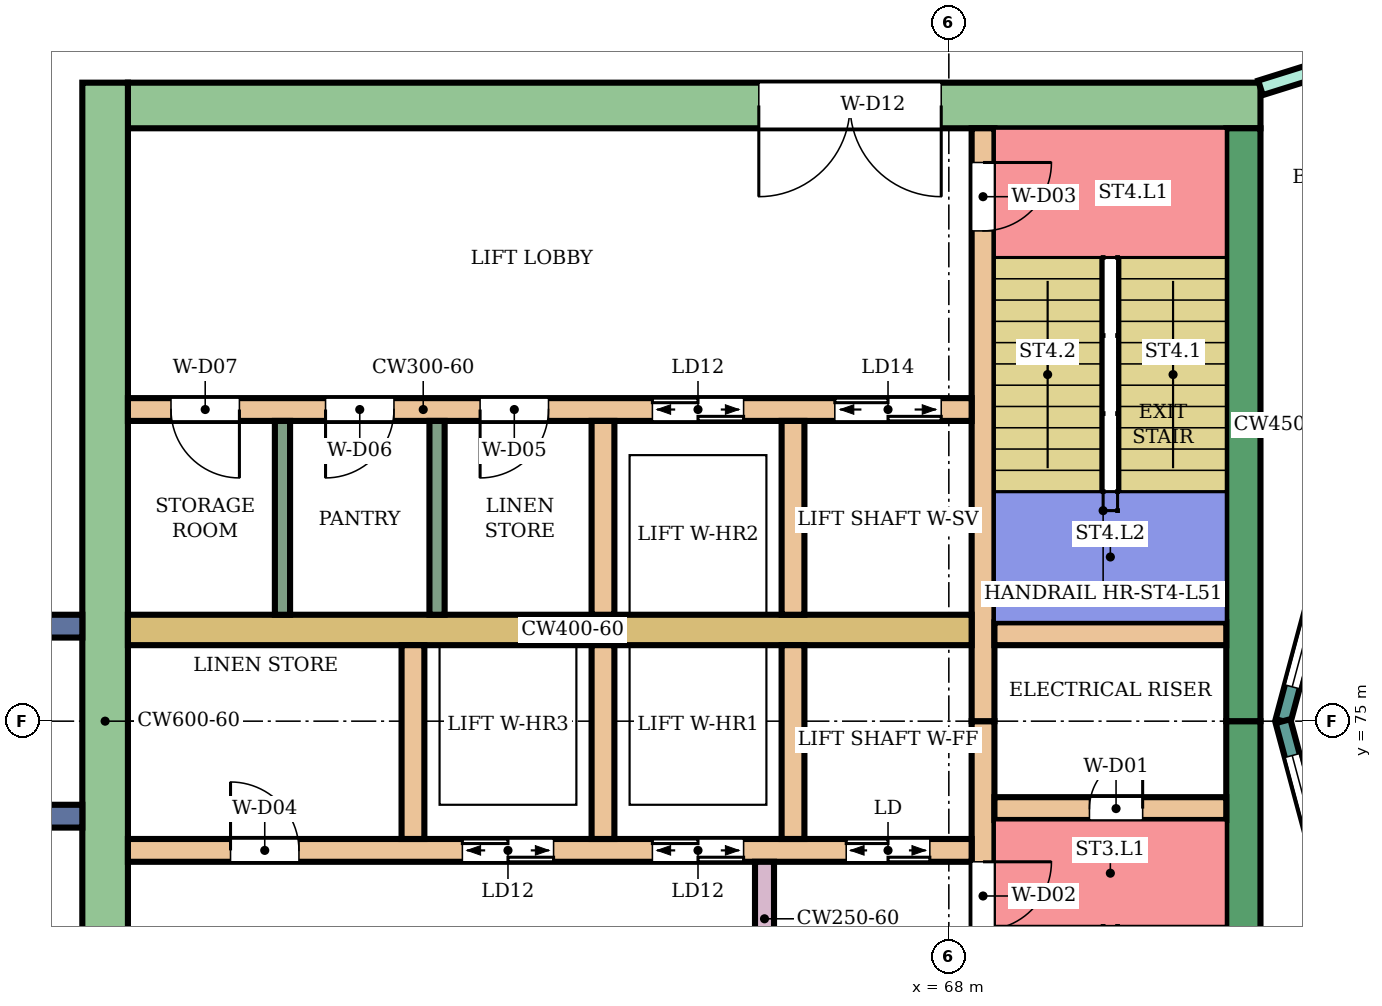
"""IFC4 building model, lengths in metres.
Left out: names, types, materials, properties, quantities, classifications, styles, units other than length and angle.
Written with IfcOpenShell. Run it as: python <this file> out.ifc"""

import sys

from ifc_helpers import new_model, si_unit, direction, frame, frame_2d, origin, place, context, subcontext, project, spatial, rectangle, extrude, element, fill, save


model = new_model("IFC4")
c1 = context("Model", 3, precision=1e-05, world=origin(), true_north=direction((0.0, 1.0)))
c2 = subcontext(c1, "Body", "Model", "MODEL_VIEW")
j1 = project(units=[si_unit("LENGTHUNIT", "METRE"), si_unit("PLANEANGLEUNIT", "RADIAN")], contexts=[c1])
p1 = place(None, origin())
s1 = spatial("IfcSite", under=j1, at=p1, CompositionType="ELEMENT")
p2 = place(p1, origin())
s2 = spatial("IfcBuilding", under=s1, at=p2, CompositionType="ELEMENT")
p3 = place(p2, frame((0.0, 0.0, 220.9)))
s3 = spatial("IfcBuildingStorey", under=s2, at=p3, CompositionType="ELEMENT", Elevation=220.9)
p4 = place(p3, frame((72.1, 83.1, 0.0), z_axis=(0.0, 0.0, 1.0), x_axis=(-1.0, 0.0, 0.0)))
e1 = element("IfcWall", 1, at=p4, inside=s3, PredefinedType="SHEAR", context=c2, shape_type="SweptSolid", body=[
    extrude(rectangle(XDim=14.9, YDim=0.6, at=frame_2d((7.45, 0.0))), origin(), (0.0, 0.0, 1.0), 3.88),
])
p5 = place(p4, frame((4.2, 0.0, 0.0)))
e2 = element("IfcOpeningElement", 2, at=p5, cuts=e1, PredefinedType="OPENING", context=c2, shape_type="SweptSolid", body=[
    extrude(rectangle(XDim=2.4, YDim=2.4, at=frame_2d((1.2, 1.2))), frame((0.0, 0.31, 0.0), z_axis=(0.0, -1.0, 0.0), x_axis=(1.0, 0.0, 0.0)), (0.0, 0.0, 1.0), 0.62),
])
for number, where, z_axis, x_axis in (
    (3, (71.875, 75.0, 0.0), (0.0, 0.0, 1.0), (0.0, -1.0, 0.0)),
    (4, (71.875, 82.8, 0.0), (0.0, 0.0, 1.0), (0.0, -1.0, 0.0)),
):
    element("IfcWall", number, at=place(p3, frame(where, z_axis=z_axis, x_axis=x_axis)), inside=s3, PredefinedType="SHEAR", context=c2, shape_type="SweptSolid", body=[
        extrude(rectangle(XDim=7.8, YDim=0.45, at=frame_2d((3.9, 0.0))), origin(), (0.0, 0.0, 1.0), 3.88),
    ])
p6 = place(p3, frame((56.9, 83.4, 0.0), z_axis=(0.0, 0.0, 1.0), x_axis=(0.0, -1.0, 0.0)))
e5 = element("IfcWall", 5, at=p6, inside=s3, PredefinedType="SHEAR", context=c2, shape_type="SweptSolid", body=[
    extrude(rectangle(XDim=16.8, YDim=0.6, at=frame_2d((8.4, 0.0))), origin(), (0.0, 0.0, 1.0), 3.88),
])
p7 = place(p3, frame((68.45, 75.0, 0.0), z_axis=(0.0, 0.0, 1.0), x_axis=(0.0, -1.0, 0.0)))
e6 = element("IfcWall", 6, at=p7, inside=s3, PredefinedType="SHEAR", context=c2, shape_type="SweptSolid", body=[
    extrude(rectangle(XDim=7.8, YDim=0.3, at=frame_2d((3.9, 0.0))), origin(), (0.0, 0.0, 1.0), 3.88),
])
p8 = place(p7, frame((1.85, 0.0, 0.0)))
e7 = element("IfcOpeningElement", 7, at=p8, cuts=e6, PredefinedType="OPENING", context=c2, shape_type="SweptSolid", body=[
    extrude(rectangle(XDim=0.9, YDim=2.1, at=frame_2d((0.45, 1.05))), frame((0.0, 0.16, 0.0), z_axis=(0.0, -1.0, 0.0), x_axis=(1.0, 0.0, 0.0)), (0.0, 0.0, 1.0), 0.32),
])
p9 = place(p3, frame((68.45, 82.8, 0.0), z_axis=(0.0, 0.0, 1.0), x_axis=(0.0, -1.0, 0.0)))
e8 = element("IfcWall", 8, at=p9, inside=s3, PredefinedType="SHEAR", context=c2, shape_type="SweptSolid", body=[
    extrude(rectangle(XDim=7.8, YDim=0.3, at=frame_2d((3.9, 0.0))), origin(), (0.0, 0.0, 1.0), 3.88),
])
p10 = place(p9, frame((0.45, 0.0, 0.0)))
e9 = element("IfcOpeningElement", 9, at=p10, cuts=e8, PredefinedType="OPENING", context=c2, shape_type="SweptSolid", body=[
    extrude(rectangle(XDim=0.9, YDim=2.1, at=frame_2d((0.45, 1.05))), frame((0.0, 0.16, 0.0), z_axis=(0.0, -1.0, 0.0), x_axis=(1.0, 0.0, 0.0)), (0.0, 0.0, 1.0), 0.32),
])
p11 = place(p3, frame((71.65, 73.85, 0.0), z_axis=(0.0, 0.0, 1.0), x_axis=(-1.0, 0.0, 0.0)))
e10 = element("IfcWall", 10, at=p11, inside=s3, PredefinedType="SHEAR", context=c2, shape_type="SweptSolid", body=[
    extrude(rectangle(XDim=3.05, YDim=0.3, at=frame_2d((1.525, 0.0))), origin(), (0.0, 0.0, 1.0), 3.88),
])
p12 = place(p11, frame((1.1, 0.0, 0.0)))
e11 = element("IfcOpeningElement", 11, at=p12, cuts=e10, PredefinedType="OPENING", context=c2, shape_type="SweptSolid", body=[
    extrude(rectangle(XDim=0.7, YDim=2.0, at=frame_2d((0.35, 1.0))), frame((0.0, 0.16, 0.0), z_axis=(0.0, -1.0, 0.0), x_axis=(1.0, 0.0, 0.0)), (0.0, 0.0, 1.0), 0.32),
])
p13 = place(p3, frame((71.65, 76.15, 0.0), z_axis=(0.0, 0.0, 1.0), x_axis=(-1.0, 0.0, 0.0)))
e12 = element("IfcWall", 12, at=p13, inside=s3, PredefinedType="SHEAR", context=c2, shape_type="SweptSolid", body=[
    extrude(rectangle(XDim=3.05, YDim=0.3, at=frame_2d((1.525, 0.0))), origin(), (0.0, 0.0, 1.0), 3.88),
])
p14 = place(p3, frame((68.3, 73.3, 0.0), z_axis=(0.0, 0.0, 1.0), x_axis=(-1.0, 0.0, 0.0)))
e13 = element("IfcWall", 13, at=p14, inside=s3, PredefinedType="SHEAR", context=c2, shape_type="SweptSolid", body=[
    extrude(rectangle(XDim=11.1, YDim=0.3, at=frame_2d((5.55, 0.0))), origin(), (0.0, 0.0, 1.0), 3.88),
])
p15 = place(p14, frame((0.55, 0.0, 0.0)))
e14 = element("IfcOpeningElement", 14, at=p15, cuts=e13, PredefinedType="OPENING", context=c2, shape_type="SweptSolid", body=[
    extrude(rectangle(XDim=1.1, YDim=2.1, at=frame_2d((0.55, 1.05))), frame((0.0, 0.16, 0.0), z_axis=(0.0, -1.0, 0.0), x_axis=(1.0, 0.0, 0.0)), (0.0, 0.0, 1.0), 0.32),
])
p16 = place(p14, frame((3.0, 0.0, 0.0)))
e15 = element("IfcOpeningElement", 15, at=p16, cuts=e13, PredefinedType="OPENING", context=c2, shape_type="SweptSolid", body=[
    extrude(rectangle(XDim=1.2, YDim=2.1, at=frame_2d((0.6, 1.05))), frame((0.0, 0.16, 0.0), z_axis=(0.0, -1.0, 0.0), x_axis=(1.0, 0.0, 0.0)), (0.0, 0.0, 1.0), 0.32),
])
p17 = place(p14, frame((5.5, 0.0, 0.0)))
e16 = element("IfcOpeningElement", 16, at=p17, cuts=e13, PredefinedType="OPENING", context=c2, shape_type="SweptSolid", body=[
    extrude(rectangle(XDim=1.2, YDim=2.1, at=frame_2d((0.6, 1.05))), frame((0.0, 0.16, 0.0), z_axis=(0.0, -1.0, 0.0), x_axis=(1.0, 0.0, 0.0)), (0.0, 0.0, 1.0), 0.32),
])
p18 = place(p14, frame((8.85, 0.0, 0.0)))
e17 = element("IfcOpeningElement", 17, at=p18, cuts=e13, PredefinedType="OPENING", context=c2, shape_type="SweptSolid", body=[
    extrude(rectangle(XDim=0.9, YDim=2.1, at=frame_2d((0.45, 1.05))), frame((0.0, 0.16, 0.0), z_axis=(0.0, -1.0, 0.0), x_axis=(1.0, 0.0, 0.0)), (0.0, 0.0, 1.0), 0.32),
])
p19 = place(p3, frame((68.3, 76.2, 0.0), z_axis=(0.0, 0.0, 1.0), x_axis=(-1.0, 0.0, 0.0)))
e18 = element("IfcWall", 18, at=p19, inside=s3, PredefinedType="SHEAR", context=c2, shape_type="SweptSolid", body=[
    extrude(rectangle(XDim=11.1, YDim=0.4, at=frame_2d((5.55, 0.0))), origin(), (0.0, 0.0, 1.0), 3.88),
])
p20 = place(p3, frame((68.3, 79.1, 0.0), z_axis=(0.0, 0.0, 1.0), x_axis=(-1.0, 0.0, 0.0)))
e19 = element("IfcWall", 19, at=p20, inside=s3, PredefinedType="SHEAR", context=c2, shape_type="SweptSolid", body=[
    extrude(rectangle(XDim=11.1, YDim=0.3, at=frame_2d((5.55, 0.0))), origin(), (0.0, 0.0, 1.0), 3.88),
])
p21 = place(p20, frame((0.4, 0.0, 0.0)))
e20 = element("IfcOpeningElement", 20, at=p21, cuts=e19, PredefinedType="OPENING", context=c2, shape_type="SweptSolid", body=[
    extrude(rectangle(XDim=1.4, YDim=2.1, at=frame_2d((0.7, 1.05))), frame((0.0, 0.16, 0.0), z_axis=(0.0, -1.0, 0.0), x_axis=(1.0, 0.0, 0.0)), (0.0, 0.0, 1.0), 0.32),
])
p22 = place(p20, frame((3.0, 0.0, 0.0)))
e21 = element("IfcOpeningElement", 21, at=p22, cuts=e19, PredefinedType="OPENING", context=c2, shape_type="SweptSolid", body=[
    extrude(rectangle(XDim=1.2, YDim=2.1, at=frame_2d((0.6, 1.05))), frame((0.0, 0.16, 0.0), z_axis=(0.0, -1.0, 0.0), x_axis=(1.0, 0.0, 0.0)), (0.0, 0.0, 1.0), 0.32),
])
p23 = place(p20, frame((5.567, 0.0, 0.0)))
e22 = element("IfcOpeningElement", 22, at=p23, cuts=e19, PredefinedType="OPENING", context=c2, shape_type="SweptSolid", body=[
    extrude(rectangle(XDim=0.9, YDim=2.1, at=frame_2d((0.45, 1.05))), frame((0.0, 0.16, 0.0), z_axis=(0.0, -1.0, 0.0), x_axis=(1.0, 0.0, 0.0)), (0.0, 0.0, 1.0), 0.32),
])
p24 = place(p20, frame((7.6, 0.0, 0.0)))
e23 = element("IfcOpeningElement", 23, at=p24, cuts=e19, PredefinedType="OPENING", context=c2, shape_type="SweptSolid", body=[
    extrude(rectangle(XDim=0.9, YDim=2.1, at=frame_2d((0.45, 1.05))), frame((0.0, 0.16, 0.0), z_axis=(0.0, -1.0, 0.0), x_axis=(1.0, 0.0, 0.0)), (0.0, 0.0, 1.0), 0.32),
])
p25 = place(p20, frame((9.633, 0.0, 0.0)))
e24 = element("IfcOpeningElement", 24, at=p25, cuts=e19, PredefinedType="OPENING", context=c2, shape_type="SweptSolid", body=[
    extrude(rectangle(XDim=0.9, YDim=2.1, at=frame_2d((0.45, 1.05))), frame((0.0, 0.16, 0.0), z_axis=(0.0, -1.0, 0.0), x_axis=(1.0, 0.0, 0.0)), (0.0, 0.0, 1.0), 0.32),
])
for number, where, z_axis, x_axis in (
    (25, (65.95, 76.0, 0.0), (0.0, 0.0, 1.0), (0.0, -1.0, 0.0)),
    (26, (63.45, 76.0, 0.0), (0.0, 0.0, 1.0), (0.0, -1.0, 0.0)),
    (27, (60.95, 76.0, 0.0), (0.0, 0.0, 1.0), (0.0, -1.0, 0.0)),
    (28, (65.95, 78.95, 0.0), (0.0, 0.0, 1.0), (0.0, -1.0, 0.0)),
    (29, (63.45, 78.95, 0.0), (0.0, 0.0, 1.0), (0.0, -1.0, 0.0)),
):
    element("IfcWall", number, at=place(p3, frame(where, z_axis=z_axis, x_axis=x_axis)), inside=s3, PredefinedType="SHEAR", context=c2, shape_type="SweptSolid", body=[
        extrude(rectangle(XDim=2.55, YDim=0.3, at=frame_2d((1.275, 0.0))), origin(), (0.0, 0.0, 1.0), 3.88),
    ])
p26 = place(p3, frame((65.575, 73.15, 0.0), z_axis=(0.0, 0.0, 1.0), x_axis=(0.0, -1.0, 0.0)))
e30 = element("IfcWall", 30, at=p26, inside=s3, PredefinedType="SHEAR", context=c2, shape_type="SweptSolid", body=[
    extrude(rectangle(XDim=1.5, YDim=0.25, at=frame_2d((0.75, 0.0))), origin(), (0.0, 0.0, 1.0), 3.88),
])
for number, where, z_axis, x_axis in (
    (31, (56.6, 76.25, 0.0), (0.0, 0.0, 1.0), (-1.0, 0.0, 0.0)),
    (32, (56.6, 73.75, 0.0), (0.0, 0.0, 1.0), (-1.0, 0.0, 0.0)),
):
    element("IfcWall", number, at=place(p3, frame(where, z_axis=z_axis, x_axis=x_axis)), inside=s3, PredefinedType="NOTDEFINED", context=c2, shape_type="SweptSolid", body=[
        extrude(rectangle(XDim=2.416, YDim=0.3, at=frame_2d((1.208, 0.0))), origin(), (0.0, 0.0, 1.0), 4.2),
    ])
p27 = place(p3, frame((73.415, 78.802, 0.0), z_axis=(0.0, 0.0, 1.0), x_axis=(-0.258789828301, -0.965933654434, 0.0)))
e33 = element("IfcWall", 33, at=p27, inside=s3, PredefinedType="NOTDEFINED", context=c2, shape_type="SweptSolid", body=[
    extrude(rectangle(XDim=3.936, YDim=0.2, at=frame_2d((1.968, 0.0))), origin(), (0.0, 0.0, 1.0), 4.2),
])
p28 = place(p27, frame((0.468, 0.0, 0.9)))
e34 = element("IfcOpeningElement", 34, at=p28, cuts=e33, PredefinedType="OPENING", context=c2, shape_type="SweptSolid", body=[
    extrude(rectangle(XDim=3.0, YDim=2.3, at=frame_2d((1.5, 1.15))), frame((0.0, 0.11, 0.0), z_axis=(0.0, -1.0, 0.0), x_axis=(1.0, 0.0, 0.0)), (0.0, 0.0, 1.0), 0.22),
])
p29 = place(p3, frame((72.396, 75.0, 0.0), z_axis=(0.0, 0.0, 1.0), x_axis=(0.258789828301, -0.965933654434, 0.0)))
e35 = element("IfcWall", 35, at=p29, inside=s3, PredefinedType="NOTDEFINED", context=c2, shape_type="SweptSolid", body=[
    extrude(rectangle(XDim=3.936, YDim=0.2, at=frame_2d((1.968, 0.0))), origin(), (0.0, 0.0, 1.0), 4.2),
])
p30 = place(p29, frame((0.468, 0.0, 0.9)))
e36 = element("IfcOpeningElement", 36, at=p30, cuts=e35, PredefinedType="OPENING", context=c2, shape_type="SweptSolid", body=[
    extrude(rectangle(XDim=3.0, YDim=2.3, at=frame_2d((1.5, 1.15))), frame((0.0, 0.11, 0.0), z_axis=(0.0, -1.0, 0.0), x_axis=(1.0, 0.0, 0.0)), (0.0, 0.0, 1.0), 0.22),
])
p31 = place(p3, frame((72.1, 83.332, 0.0), z_axis=(0.0, 0.0, 1.0), x_axis=(0.954233106619, 0.299063836383, 0.0)))
e37 = element("IfcWall", 37, at=p31, inside=s3, PredefinedType="PARTITIONING", context=c2, shape_type="SweptSolid", body=[
    extrude(rectangle(XDim=2.414, YDim=0.2, at=frame_2d((1.207, 0.0))), origin(), (0.0, 0.0, 1.0), 3.75),
])
p32 = place(p31, frame((0.762, 0.0, 0.0)))
e38 = element("IfcOpeningElement", 38, at=p32, cuts=e37, PredefinedType="OPENING", context=c2, shape_type="SweptSolid", body=[
    extrude(rectangle(XDim=0.9, YDim=2.1, at=frame_2d((0.45, 1.05))), frame((0.0, 0.11, 0.0), z_axis=(0.0, -1.0, 0.0), x_axis=(1.0, 0.0, 0.0)), (0.0, 0.0, 1.0), 0.22),
])
for number, where, z_axis, x_axis in (
    (39, (61.267, 78.95, 0.0), (0.0, 0.0, 1.0), (0.0, -1.0, 0.0)),
    (40, (59.233, 78.95, 0.0), (0.0, 0.0, 1.0), (0.0, -1.0, 0.0)),
):
    element("IfcWall", number, at=place(p3, frame(where, z_axis=z_axis, x_axis=x_axis)), inside=s3, PredefinedType="PARTITIONING", context=c2, shape_type="SweptSolid", body=[
        extrude(rectangle(XDim=2.55, YDim=0.2, at=frame_2d((1.275, 0.0))), origin(), (0.0, 0.0, 1.0), 3.88),
    ])
p33 = place(p28, origin())
e41 = element("IfcWindow", 41, at=p33, inside=s3, PartitioningType="SINGLE_PANEL", PredefinedType="WINDOW", context=c2, shape_type="SweptSolid", body=[
    extrude(rectangle(XDim=3.0, YDim=2.3, at=frame_2d((1.5, 1.15))), frame((0.0, 0.03, 0.0), z_axis=(0.0, -1.0, 0.0), x_axis=(1.0, 0.0, 0.0)), (0.0, 0.0, 1.0), 0.06),
])
fill(e34, e41)
p34 = place(p30, origin())
e42 = element("IfcWindow", 42, at=p34, inside=s3, PartitioningType="SINGLE_PANEL", PredefinedType="WINDOW", context=c2, shape_type="SweptSolid", body=[
    extrude(rectangle(XDim=3.0, YDim=2.3, at=frame_2d((1.5, 1.15))), frame((0.0, 0.03, 0.0), z_axis=(0.0, -1.0, 0.0), x_axis=(1.0, 0.0, 0.0)), (0.0, 0.0, 1.0), 0.06),
])
fill(e36, e42)
p35 = place(p12, frame((0.7, 0.0, 0.0), z_axis=(0.0, 0.0, 1.0), x_axis=(-1.0, 0.0, 0.0)))
e43 = element("IfcDoor", 43, at=p35, inside=s3, OperationType="SINGLE_SWING_RIGHT", PredefinedType="DOOR", context=c2, shape_type="SweptSolid", body=[
    extrude(rectangle(XDim=0.7, YDim=2.0, at=frame_2d((0.35, 1.0))), frame((0.0, 0.025, 0.0), z_axis=(0.0, -1.0, 0.0), x_axis=(1.0, 0.0, 0.0)), (0.0, 0.0, 1.0), 0.05),
])
fill(e11, e43)
p36 = place(p8, origin())
e44 = element("IfcDoor", 44, at=p36, inside=s3, OperationType="SINGLE_SWING_LEFT", PredefinedType="DOOR", context=c2, shape_type="SweptSolid", body=[
    extrude(rectangle(XDim=0.9, YDim=2.1, at=frame_2d((0.45, 1.05))), frame((0.0, 0.025, 0.0), z_axis=(0.0, -1.0, 0.0), x_axis=(1.0, 0.0, 0.0)), (0.0, 0.0, 1.0), 0.05),
])
fill(e7, e44)
p37 = place(p10, origin())
e45 = element("IfcDoor", 45, at=p37, inside=s3, OperationType="SINGLE_SWING_LEFT", PredefinedType="DOOR", context=c2, shape_type="SweptSolid", body=[
    extrude(rectangle(XDim=0.9, YDim=2.1, at=frame_2d((0.45, 1.05))), frame((0.0, 0.025, 0.0), z_axis=(0.0, -1.0, 0.0), x_axis=(1.0, 0.0, 0.0)), (0.0, 0.0, 1.0), 0.05),
])
fill(e9, e45)
p38 = place(p15, origin())
e46 = element("IfcDoor", 46, at=p38, inside=s3, OperationType="DOUBLE_DOOR_SLIDING", PredefinedType="DOOR", context=c2, shape_type="SweptSolid", body=[
    extrude(rectangle(XDim=1.1, YDim=2.1, at=frame_2d((0.55, 1.05))), frame((0.0, 0.025, 0.0), z_axis=(0.0, -1.0, 0.0), x_axis=(1.0, 0.0, 0.0)), (0.0, 0.0, 1.0), 0.05),
])
fill(e14, e46)
p39 = place(p16, origin())
e47 = element("IfcDoor", 47, at=p39, inside=s3, OperationType="DOUBLE_DOOR_SLIDING", PredefinedType="DOOR", context=c2, shape_type="SweptSolid", body=[
    extrude(rectangle(XDim=1.2, YDim=2.1, at=frame_2d((0.6, 1.05))), frame((0.0, 0.025, 0.0), z_axis=(0.0, -1.0, 0.0), x_axis=(1.0, 0.0, 0.0)), (0.0, 0.0, 1.0), 0.05),
])
fill(e15, e47)
p40 = place(p17, origin())
e48 = element("IfcDoor", 48, at=p40, inside=s3, OperationType="DOUBLE_DOOR_SLIDING", PredefinedType="DOOR", context=c2, shape_type="SweptSolid", body=[
    extrude(rectangle(XDim=1.2, YDim=2.1, at=frame_2d((0.6, 1.05))), frame((0.0, 0.025, 0.0), z_axis=(0.0, -1.0, 0.0), x_axis=(1.0, 0.0, 0.0)), (0.0, 0.0, 1.0), 0.05),
])
fill(e16, e48)
p41 = place(p18, frame((0.9, 0.0, 0.0), z_axis=(0.0, 0.0, 1.0), x_axis=(-1.0, 0.0, 0.0)))
e49 = element("IfcDoor", 49, at=p41, inside=s3, OperationType="SINGLE_SWING_LEFT", PredefinedType="DOOR", context=c2, shape_type="SweptSolid", body=[
    extrude(rectangle(XDim=0.9, YDim=2.1, at=frame_2d((0.45, 1.05))), frame((0.0, 0.025, 0.0), z_axis=(0.0, -1.0, 0.0), x_axis=(1.0, 0.0, 0.0)), (0.0, 0.0, 1.0), 0.05),
])
fill(e17, e49)
p42 = place(p21, origin())
e50 = element("IfcDoor", 50, at=p42, inside=s3, OperationType="DOUBLE_DOOR_SLIDING", PredefinedType="DOOR", context=c2, shape_type="SweptSolid", body=[
    extrude(rectangle(XDim=1.4, YDim=2.1, at=frame_2d((0.7, 1.05))), frame((0.0, 0.025, 0.0), z_axis=(0.0, -1.0, 0.0), x_axis=(1.0, 0.0, 0.0)), (0.0, 0.0, 1.0), 0.05),
])
fill(e20, e50)
p43 = place(p22, origin())
e51 = element("IfcDoor", 51, at=p43, inside=s3, OperationType="DOUBLE_DOOR_SLIDING", PredefinedType="DOOR", context=c2, shape_type="SweptSolid", body=[
    extrude(rectangle(XDim=1.2, YDim=2.1, at=frame_2d((0.6, 1.05))), frame((0.0, 0.025, 0.0), z_axis=(0.0, -1.0, 0.0), x_axis=(1.0, 0.0, 0.0)), (0.0, 0.0, 1.0), 0.05),
])
fill(e21, e51)
p44 = place(p23, origin())
e52 = element("IfcDoor", 52, at=p44, inside=s3, OperationType="SINGLE_SWING_RIGHT", PredefinedType="DOOR", context=c2, shape_type="SweptSolid", body=[
    extrude(rectangle(XDim=0.9, YDim=2.1, at=frame_2d((0.45, 1.05))), frame((0.0, 0.025, 0.0), z_axis=(0.0, -1.0, 0.0), x_axis=(1.0, 0.0, 0.0)), (0.0, 0.0, 1.0), 0.05),
])
fill(e22, e52)
p45 = place(p24, origin())
e53 = element("IfcDoor", 53, at=p45, inside=s3, OperationType="SINGLE_SWING_RIGHT", PredefinedType="DOOR", context=c2, shape_type="SweptSolid", body=[
    extrude(rectangle(XDim=0.9, YDim=2.1, at=frame_2d((0.45, 1.05))), frame((0.0, 0.025, 0.0), z_axis=(0.0, -1.0, 0.0), x_axis=(1.0, 0.0, 0.0)), (0.0, 0.0, 1.0), 0.05),
])
fill(e23, e53)
p46 = place(p25, origin())
e54 = element("IfcDoor", 54, at=p46, inside=s3, OperationType="SINGLE_SWING_LEFT", PredefinedType="DOOR", context=c2, shape_type="SweptSolid", body=[
    extrude(rectangle(XDim=0.9, YDim=2.1, at=frame_2d((0.45, 1.05))), frame((0.0, 0.025, 0.0), z_axis=(0.0, -1.0, 0.0), x_axis=(1.0, 0.0, 0.0)), (0.0, 0.0, 1.0), 0.05),
])
fill(e24, e54)
p47 = place(p5, origin())
e55 = element("IfcDoor", 55, at=p47, inside=s3, OperationType="DOUBLE_DOOR_SINGLE_SWING", PredefinedType="DOOR", context=c2, shape_type="SweptSolid", body=[
    extrude(rectangle(XDim=2.4, YDim=2.4, at=frame_2d((1.2, 1.2))), frame((0.0, 0.025, 0.0), z_axis=(0.0, -1.0, 0.0), x_axis=(1.0, 0.0, 0.0)), (0.0, 0.0, 1.0), 0.05),
])
fill(e2, e55)
save(model, sys.argv[1])
